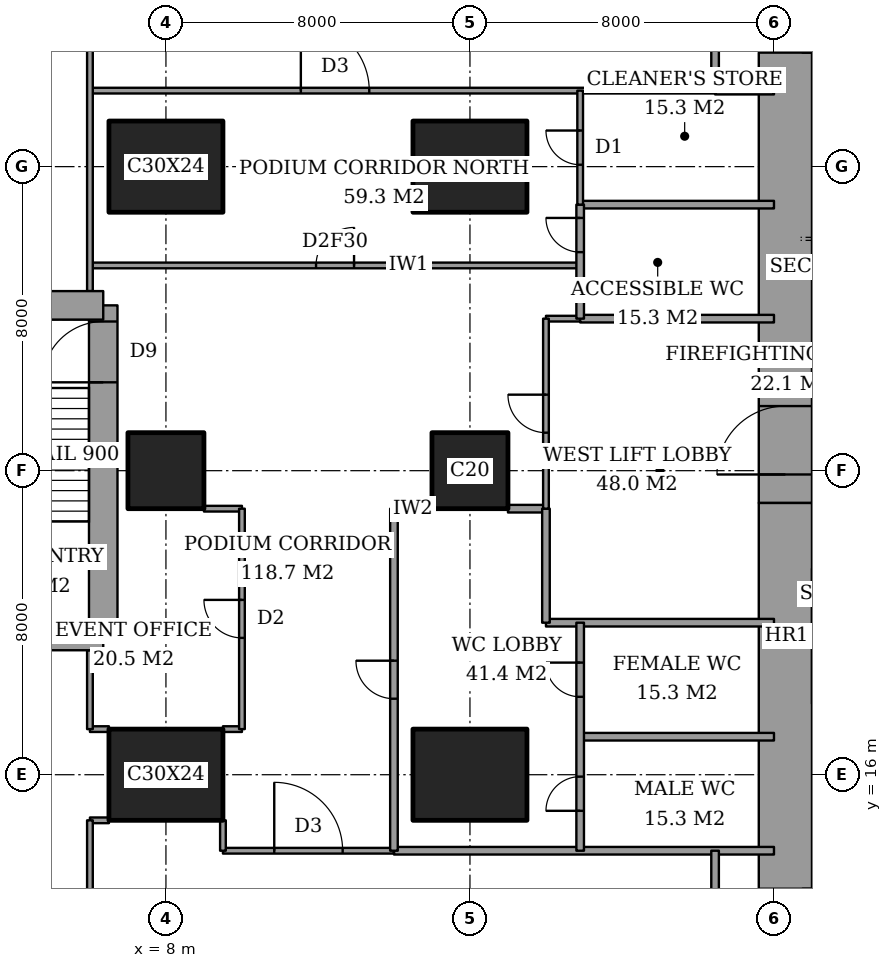
"""IFC4 building model, lengths in metres.
Left out: names, types, materials, properties, quantities, classifications, styles, units other than length and angle.
Written with IfcOpenShell. Run it as: python <this file> out.ifc"""

import sys

from ifc_helpers import new_model, si_unit, direction, frame, frame_2d, origin, origin_2d, place, context, subcontext, project, spatial, rectangle, extrude, element, fill, save


model = new_model("IFC4")
c1 = context("Model", 3, precision=1e-05, world=origin(), true_north=direction((0.0, 1.0)))
c2 = subcontext(c1, "Body", "Model", "MODEL_VIEW")
j1 = project(units=[si_unit("LENGTHUNIT", "METRE"), si_unit("PLANEANGLEUNIT", "RADIAN")], contexts=[c1])
p1 = place(None, origin())
s1 = spatial("IfcSite", under=j1, at=p1, CompositionType="ELEMENT")
p2 = place(p1, origin())
s2 = spatial("IfcBuilding", under=s1, at=p2, CompositionType="ELEMENT")
p3 = place(p2, frame((0.0, 0.0, 21.0)))
s3 = spatial("IfcBuildingStorey", under=s2, at=p3, CompositionType="ELEMENT", Elevation=21.0)
p4 = place(p3, frame((8.0, 16.0, 0.0), z_axis=(0.0, 0.0, 1.0), x_axis=(1.0, 0.0, 0.0)))
e1 = element("IfcColumn", 1, at=p4, inside=s3, PredefinedType="COLUMN", context=c2, shape_type="SweptSolid", body=[
    extrude(rectangle(XDim=3.0, YDim=2.4, at=origin_2d()), origin(), (0.0, 0.0, 1.0), 5.0),
])
p5 = place(p3, frame((8.0, 24.0, 0.0), z_axis=(0.0, 0.0, 1.0), x_axis=(1.0, 0.0, 0.0)))
e2 = element("IfcColumn", 2, at=p5, inside=s3, PredefinedType="COLUMN", context=c2, shape_type="SweptSolid", body=[
    extrude(rectangle(XDim=2.0, YDim=2.0, at=origin_2d()), origin(), (0.0, 0.0, 1.0), 5.0),
])
for number, where, z_axis, x_axis in (
    (3, (8.0, 32.0, 0.0), (0.0, 0.0, 1.0), (1.0, 0.0, 0.0)),
    (4, (16.0, 16.0, 0.0), (0.0, 0.0, 1.0), (1.0, 0.0, 0.0)),
):
    element("IfcColumn", number, at=place(p3, frame(where, z_axis=z_axis, x_axis=x_axis)), inside=s3, PredefinedType="COLUMN", context=c2, shape_type="SweptSolid", body=[
        extrude(rectangle(XDim=3.0, YDim=2.4, at=origin_2d()), origin(), (0.0, 0.0, 1.0), 5.0),
    ])
p6 = place(p3, frame((16.0, 24.0, 0.0), z_axis=(0.0, 0.0, 1.0), x_axis=(1.0, 0.0, 0.0)))
e5 = element("IfcColumn", 5, at=p6, inside=s3, PredefinedType="COLUMN", context=c2, shape_type="SweptSolid", body=[
    extrude(rectangle(XDim=2.0, YDim=2.0, at=origin_2d()), origin(), (0.0, 0.0, 1.0), 5.0),
])
p7 = place(p3, frame((16.0, 32.0, 0.0), z_axis=(0.0, 0.0, 1.0), x_axis=(1.0, 0.0, 0.0)))
e6 = element("IfcColumn", 6, at=p7, inside=s3, PredefinedType="COLUMN", context=c2, shape_type="SweptSolid", body=[
    extrude(rectangle(XDim=3.0, YDim=2.4, at=origin_2d()), origin(), (0.0, 0.0, 1.0), 5.0),
])
p8 = place(p3, frame((24.3, 13.0, 0.0), z_axis=(0.0, 0.0, 1.0), x_axis=(0.0, 1.0, 0.0)))
e7 = element("IfcWall", 7, at=p8, inside=s3, PredefinedType="SHEAR", context=c2, shape_type="SweptSolid", body=[
    extrude(rectangle(XDim=10.15, YDim=1.4, at=frame_2d((5.075, 0.0))), origin(), (0.0, 0.0, 1.0), 5.0),
])
p9 = place(p3, frame((24.3, 23.15, 0.0), z_axis=(0.0, 0.0, 1.0), x_axis=(0.0, 1.0, 0.0)))
e8 = element("IfcWall", 8, at=p9, inside=s3, PredefinedType="SHEAR", context=c2, shape_type="SweptSolid", body=[
    extrude(rectangle(XDim=11.85, YDim=1.4, at=frame_2d((5.925, 0.0))), origin(), (0.0, 0.0, 1.0), 5.0),
])
p10 = place(p9, frame((0.75, 0.0, 0.0)))
e9 = element("IfcOpeningElement", 9, at=p10, cuts=e8, PredefinedType="OPENING", context=c2, shape_type="SweptSolid", body=[
    extrude(rectangle(XDim=1.8, YDim=2.4, at=frame_2d((0.9, 1.2))), frame((0.0, 0.71, 0.0), z_axis=(0.0, -1.0, 0.0), x_axis=(1.0, 0.0, 0.0)), (0.0, 0.0, 1.0), 1.42),
])
p11 = place(p3, frame((1.9, 19.65, 0.0), z_axis=(0.0, 0.0, 1.0), x_axis=(1.0, 0.0, 0.0)))
e10 = element("IfcWall", 10, at=p11, inside=s3, PredefinedType="SHEAR", context=c2, shape_type="SweptSolid", body=[
    extrude(rectangle(XDim=4.45, YDim=0.75, at=frame_2d((2.225, 0.0))), origin(), (0.0, 0.0, 1.0), 5.0),
])
p12 = place(p3, frame((6.35, 19.65, 0.0), z_axis=(0.0, 0.0, 1.0), x_axis=(0.0, 1.0, 0.0)))
e11 = element("IfcWall", 11, at=p12, inside=s3, PredefinedType="SHEAR", context=c2, shape_type="SweptSolid", body=[
    extrude(rectangle(XDim=8.7, YDim=0.75, at=frame_2d((4.35, 0.0))), origin(), (0.0, 0.0, 1.0), 5.0),
])
p13 = place(p12, frame((6.675, 0.0, 0.0)))
e12 = element("IfcOpeningElement", 12, at=p13, cuts=e11, PredefinedType="OPENING", context=c2, shape_type="SweptSolid", body=[
    extrude(rectangle(XDim=1.6, YDim=2.1, at=frame_2d((0.8, 1.05))), frame((0.0, 0.385, 0.0), z_axis=(0.0, -1.0, 0.0), x_axis=(1.0, 0.0, 0.0)), (0.0, 0.0, 1.0), 0.77),
])
p14 = place(p3, frame((6.35, 28.35, 0.0), z_axis=(0.0, 0.0, 1.0), x_axis=(-1.0, 0.0, 0.0)))
e13 = element("IfcWall", 13, at=p14, inside=s3, PredefinedType="SHEAR", context=c2, shape_type="SweptSolid", body=[
    extrude(rectangle(XDim=4.45, YDim=0.75, at=frame_2d((2.225, 0.0))), origin(), (0.0, 0.0, 1.0), 5.0),
])
p15 = place(p3, frame((14.0, 14.0, 0.0), z_axis=(0.0, 0.0, 1.0), x_axis=(1.0, 0.0, 0.0)))
e14 = element("IfcWall", 14, at=p15, inside=s3, PredefinedType="PARTITIONING", context=c2, shape_type="SweptSolid", body=[
    extrude(rectangle(XDim=10.0, YDim=0.2, at=frame_2d((5.0, 0.0))), origin(), (0.0, 0.0, 1.0), 4.65),
])
p16 = place(p3, frame((9.5, 14.0, 0.0), z_axis=(0.0, 0.0, 1.0), x_axis=(1.0, 0.0, 0.0)))
e15 = element("IfcWall", 15, at=p16, inside=s3, PredefinedType="PARTITIONING", context=c2, shape_type="SweptSolid", body=[
    extrude(rectangle(XDim=4.5, YDim=0.15, at=frame_2d((2.25, 0.0))), origin(), (0.0, 0.0, 1.0), 4.65),
])
p17 = place(p16, frame((1.35, 0.0, 0.0)))
e16 = element("IfcOpeningElement", 16, at=p17, cuts=e15, PredefinedType="OPENING", context=c2, shape_type="SweptSolid", body=[
    extrude(rectangle(XDim=1.8, YDim=2.1, at=frame_2d((0.9, 1.05))), frame((0.0, 0.085, 0.0), z_axis=(0.0, -1.0, 0.0), x_axis=(1.0, 0.0, 0.0)), (0.0, 0.0, 1.0), 0.17),
])
p18 = place(p3, frame((6.0, 14.8, 0.0), z_axis=(0.0, 0.0, 1.0), x_axis=(1.0, 0.0, 0.0)))
e17 = element("IfcWall", 17, at=p18, inside=s3, PredefinedType="PARTITIONING", context=c2, shape_type="SweptSolid", body=[
    extrude(rectangle(XDim=0.5, YDim=0.15, at=frame_2d((0.25, 0.0))), origin(), (0.0, 0.0, 1.0), 4.65),
])
p19 = place(p3, frame((18.9, 17.0, 0.0), z_axis=(0.0, 0.0, 1.0), x_axis=(1.0, 0.0, 0.0)))
e18 = element("IfcWall", 18, at=p19, inside=s3, PredefinedType="PARTITIONING", context=c2, shape_type="SweptSolid", body=[
    extrude(rectangle(XDim=5.1, YDim=0.2, at=frame_2d((2.55, 0.0))), origin(), (0.0, 0.0, 1.0), 4.65),
])
for number, where, z_axis, x_axis in (
    (19, (6.0, 17.2, 0.0), (0.0, 0.0, 1.0), (1.0, 0.0, 0.0)),
    (20, (9.5, 17.2, 0.0), (0.0, 0.0, 1.0), (1.0, 0.0, 0.0)),
):
    element("IfcWall", number, at=place(p3, frame(where, z_axis=z_axis, x_axis=x_axis)), inside=s3, PredefinedType="PARTITIONING", context=c2, shape_type="SweptSolid", body=[
        extrude(rectangle(XDim=0.5, YDim=0.15, at=frame_2d((0.25, 0.0))), origin(), (0.0, 0.0, 1.0), 4.65),
    ])
p20 = place(p3, frame((18.0, 20.0, 0.0), z_axis=(0.0, 0.0, 1.0), x_axis=(1.0, 0.0, 0.0)))
e21 = element("IfcWall", 21, at=p20, inside=s3, PredefinedType="PARTITIONING", context=c2, shape_type="SweptSolid", body=[
    extrude(rectangle(XDim=6.0, YDim=0.2, at=frame_2d((3.0, 0.0))), origin(), (0.0, 0.0, 1.0), 4.65),
])
for number, where, z_axis, x_axis in (
    (22, (14.0, 23.0, 0.0), (0.0, 0.0, 1.0), (1.0, 0.0, 0.0)),
    (23, (17.0, 23.0, 0.0), (0.0, 0.0, 1.0), (1.0, 0.0, 0.0)),
):
    element("IfcWall", number, at=place(p3, frame(where, z_axis=z_axis, x_axis=x_axis)), inside=s3, PredefinedType="PARTITIONING", context=c2, shape_type="SweptSolid", body=[
        extrude(rectangle(XDim=1.0, YDim=0.2, at=frame_2d((0.5, 0.0))), origin(), (0.0, 0.0, 1.0), 4.65),
    ])
p21 = place(p3, frame((9.0, 23.0, 0.0), z_axis=(0.0, 0.0, 1.0), x_axis=(1.0, 0.0, 0.0)))
e24 = element("IfcWall", 24, at=p21, inside=s3, PredefinedType="PARTITIONING", context=c2, shape_type="SweptSolid", body=[
    extrude(rectangle(XDim=1.0, YDim=0.15, at=frame_2d((0.5, 0.0))), origin(), (0.0, 0.0, 1.0), 4.65),
])
p22 = place(p3, frame((18.9, 28.0, 0.0), z_axis=(0.0, 0.0, 1.0), x_axis=(1.0, 0.0, 0.0)))
e25 = element("IfcWall", 25, at=p22, inside=s3, PredefinedType="PARTITIONING", context=c2, shape_type="SweptSolid", body=[
    extrude(rectangle(XDim=5.1, YDim=0.2, at=frame_2d((2.55, 0.0))), origin(), (0.0, 0.0, 1.0), 4.65),
])
p23 = place(p3, frame((18.0, 28.0, 0.0), z_axis=(0.0, 0.0, 1.0), x_axis=(1.0, 0.0, 0.0)))
e26 = element("IfcWall", 26, at=p23, inside=s3, PredefinedType="PARTITIONING", context=c2, shape_type="SweptSolid", body=[
    extrude(rectangle(XDim=0.9, YDim=0.15, at=frame_2d((0.45, 0.0))), origin(), (0.0, 0.0, 1.0), 4.65),
])
p24 = place(p3, frame((6.0, 29.4, 0.0), z_axis=(0.0, 0.0, 1.0), x_axis=(1.0, 0.0, 0.0)))
e27 = element("IfcWall", 27, at=p24, inside=s3, PredefinedType="PARTITIONING", context=c2, shape_type="SweptSolid", body=[
    extrude(rectangle(XDim=12.9, YDim=0.15, at=frame_2d((6.45, 0.0))), origin(), (0.0, 0.0, 1.0), 4.65),
])
p25 = place(p24, frame((5.95, 0.0, 0.0)))
e28 = element("IfcOpeningElement", 28, at=p25, cuts=e27, PredefinedType="OPENING", context=c2, shape_type="SweptSolid", body=[
    extrude(rectangle(XDim=1.0, YDim=2.1, at=frame_2d((0.5, 1.05))), frame((0.0, 0.085, 0.0), z_axis=(0.0, -1.0, 0.0), x_axis=(1.0, 0.0, 0.0)), (0.0, 0.0, 1.0), 0.17),
])
p26 = place(p3, frame((18.9, 31.0, 0.0), z_axis=(0.0, 0.0, 1.0), x_axis=(1.0, 0.0, 0.0)))
e29 = element("IfcWall", 29, at=p26, inside=s3, PredefinedType="PARTITIONING", context=c2, shape_type="SweptSolid", body=[
    extrude(rectangle(XDim=5.1, YDim=0.2, at=frame_2d((2.55, 0.0))), origin(), (0.0, 0.0, 1.0), 4.65),
])
p27 = place(p3, frame((22.45, 34.0, 0.0), z_axis=(0.0, 0.0, 1.0), x_axis=(1.0, 0.0, 0.0)))
e30 = element("IfcWall", 30, at=p27, inside=s3, PredefinedType="PARTITIONING", context=c2, shape_type="SweptSolid", body=[
    extrude(rectangle(XDim=1.55, YDim=0.2, at=frame_2d((0.775, 0.0))), origin(), (0.0, 0.0, 1.0), 4.65),
])
p28 = place(p3, frame((6.0, 34.0, 0.0), z_axis=(0.0, 0.0, 1.0), x_axis=(1.0, 0.0, 0.0)))
e31 = element("IfcWall", 31, at=p28, inside=s3, PredefinedType="PARTITIONING", context=c2, shape_type="SweptSolid", body=[
    extrude(rectangle(XDim=16.45, YDim=0.15, at=frame_2d((8.225, 0.0))), origin(), (0.0, 0.0, 1.0), 4.65),
])
p29 = place(p28, frame((5.55, 0.0, 0.0)))
e32 = element("IfcOpeningElement", 32, at=p29, cuts=e31, PredefinedType="OPENING", context=c2, shape_type="SweptSolid", body=[
    extrude(rectangle(XDim=1.8, YDim=2.1, at=frame_2d((0.9, 1.05))), frame((0.0, 0.085, 0.0), z_axis=(0.0, -1.0, 0.0), x_axis=(1.0, 0.0, 0.0)), (0.0, 0.0, 1.0), 0.17),
])
p30 = place(p3, frame((6.0, 12.0, 0.0), z_axis=(0.0, 0.0, 1.0), x_axis=(0.0, 1.0, 0.0)))
e33 = element("IfcWall", 33, at=p30, inside=s3, PredefinedType="PARTITIONING", context=c2, shape_type="SweptSolid", body=[
    extrude(rectangle(XDim=2.8, YDim=0.15, at=frame_2d((1.4, 0.0))), origin(), (0.0, 0.0, 1.0), 4.65),
])
p31 = place(p3, frame((6.0, 17.2, 0.0), z_axis=(0.0, 0.0, 1.0), x_axis=(0.0, 1.0, 0.0)))
e34 = element("IfcWall", 34, at=p31, inside=s3, PredefinedType="PARTITIONING", context=c2, shape_type="SweptSolid", body=[
    extrude(rectangle(XDim=2.075, YDim=0.15, at=frame_2d((1.038, 0.0))), origin(), (0.0, 0.0, 1.0), 4.65),
])
p32 = place(p3, frame((6.0, 28.725, 0.0), z_axis=(0.0, 0.0, 1.0), x_axis=(0.0, 1.0, 0.0)))
e35 = element("IfcWall", 35, at=p32, inside=s3, PredefinedType="PARTITIONING", context=c2, shape_type="SweptSolid", body=[
    extrude(rectangle(XDim=7.275, YDim=0.15, at=frame_2d((3.637, 0.0))), origin(), (0.0, 0.0, 1.0), 4.65),
])
p33 = place(p3, frame((9.5, 14.0, 0.0), z_axis=(0.0, 0.0, 1.0), x_axis=(0.0, 1.0, 0.0)))
e36 = element("IfcWall", 36, at=p33, inside=s3, PredefinedType="PARTITIONING", context=c2, shape_type="SweptSolid", body=[
    extrude(rectangle(XDim=0.8, YDim=0.15, at=frame_2d((0.4, 0.0))), origin(), (0.0, 0.0, 1.0), 4.65),
])
p34 = place(p3, frame((10.0, 17.2, 0.0), z_axis=(0.0, 0.0, 1.0), x_axis=(0.0, 1.0, 0.0)))
e37 = element("IfcWall", 37, at=p34, inside=s3, PredefinedType="PARTITIONING", context=c2, shape_type="SweptSolid", body=[
    extrude(rectangle(XDim=5.8, YDim=0.15, at=frame_2d((2.9, 0.0))), origin(), (0.0, 0.0, 1.0), 4.65),
])
p35 = place(p34, frame((2.4, 0.0, 0.0)))
e38 = element("IfcOpeningElement", 38, at=p35, cuts=e37, PredefinedType="OPENING", context=c2, shape_type="SweptSolid", body=[
    extrude(rectangle(XDim=1.0, YDim=2.1, at=frame_2d((0.5, 1.05))), frame((0.0, 0.085, 0.0), z_axis=(0.0, -1.0, 0.0), x_axis=(1.0, 0.0, 0.0)), (0.0, 0.0, 1.0), 0.17),
])
p36 = place(p3, frame((14.0, 14.0, 0.0), z_axis=(0.0, 0.0, 1.0), x_axis=(0.0, 1.0, 0.0)))
e39 = element("IfcWall", 39, at=p36, inside=s3, PredefinedType="PARTITIONING", context=c2, shape_type="SweptSolid", body=[
    extrude(rectangle(XDim=9.0, YDim=0.2, at=frame_2d((4.5, 0.0))), origin(), (0.0, 0.0, 1.0), 4.65),
])
p37 = place(p36, frame((4.0, 0.0, 0.0)))
e40 = element("IfcOpeningElement", 40, at=p37, cuts=e39, PredefinedType="OPENING", context=c2, shape_type="SweptSolid", body=[
    extrude(rectangle(XDim=1.0, YDim=2.1, at=frame_2d((0.5, 1.05))), frame((0.0, 0.11, 0.0), z_axis=(0.0, -1.0, 0.0), x_axis=(1.0, 0.0, 0.0)), (0.0, 0.0, 1.0), 0.22),
])
p38 = place(p3, frame((18.0, 20.0, 0.0), z_axis=(0.0, 0.0, 1.0), x_axis=(0.0, 1.0, 0.0)))
e41 = element("IfcWall", 41, at=p38, inside=s3, PredefinedType="PARTITIONING", context=c2, shape_type="SweptSolid", body=[
    extrude(rectangle(XDim=3.0, YDim=0.2, at=frame_2d((1.5, 0.0))), origin(), (0.0, 0.0, 1.0), 4.65),
])
p39 = place(p3, frame((18.0, 23.0, 0.0), z_axis=(0.0, 0.0, 1.0), x_axis=(0.0, 1.0, 0.0)))
e42 = element("IfcWall", 42, at=p39, inside=s3, PredefinedType="PARTITIONING", context=c2, shape_type="SweptSolid", body=[
    extrude(rectangle(XDim=5.0, YDim=0.15, at=frame_2d((2.5, 0.0))), origin(), (0.0, 0.0, 1.0), 4.65),
])
p40 = place(p39, frame((2.0, 0.0, 0.0)))
e43 = element("IfcOpeningElement", 43, at=p40, cuts=e42, PredefinedType="OPENING", context=c2, shape_type="SweptSolid", body=[
    extrude(rectangle(XDim=1.0, YDim=2.1, at=frame_2d((0.5, 1.05))), frame((0.0, 0.085, 0.0), z_axis=(0.0, -1.0, 0.0), x_axis=(1.0, 0.0, 0.0)), (0.0, 0.0, 1.0), 0.17),
])
p41 = place(p3, frame((18.9, 14.0, 0.0), z_axis=(0.0, 0.0, 1.0), x_axis=(0.0, 1.0, 0.0)))
e44 = element("IfcWall", 44, at=p41, inside=s3, PredefinedType="PARTITIONING", context=c2, shape_type="SweptSolid", body=[
    extrude(rectangle(XDim=6.0, YDim=0.2, at=frame_2d((3.0, 0.0))), origin(), (0.0, 0.0, 1.0), 4.65),
])
p42 = place(p41, frame((1.05, 0.0, 0.0)))
e45 = element("IfcOpeningElement", 45, at=p42, cuts=e44, PredefinedType="OPENING", context=c2, shape_type="SweptSolid", body=[
    extrude(rectangle(XDim=0.9, YDim=2.1, at=frame_2d((0.45, 1.05))), frame((0.0, 0.11, 0.0), z_axis=(0.0, -1.0, 0.0), x_axis=(1.0, 0.0, 0.0)), (0.0, 0.0, 1.0), 0.22),
])
p43 = place(p41, frame((4.05, 0.0, 0.0)))
e46 = element("IfcOpeningElement", 46, at=p43, cuts=e44, PredefinedType="OPENING", context=c2, shape_type="SweptSolid", body=[
    extrude(rectangle(XDim=0.9, YDim=2.1, at=frame_2d((0.45, 1.05))), frame((0.0, 0.11, 0.0), z_axis=(0.0, -1.0, 0.0), x_axis=(1.0, 0.0, 0.0)), (0.0, 0.0, 1.0), 0.22),
])
p44 = place(p3, frame((18.9, 28.0, 0.0), z_axis=(0.0, 0.0, 1.0), x_axis=(0.0, 1.0, 0.0)))
e47 = element("IfcWall", 47, at=p44, inside=s3, PredefinedType="PARTITIONING", context=c2, shape_type="SweptSolid", body=[
    extrude(rectangle(XDim=3.0, YDim=0.2, at=frame_2d((1.5, 0.0))), origin(), (0.0, 0.0, 1.0), 4.65),
])
p45 = place(p44, frame((1.75, 0.0, 0.0)))
e48 = element("IfcOpeningElement", 48, at=p45, cuts=e47, PredefinedType="OPENING", context=c2, shape_type="SweptSolid", body=[
    extrude(rectangle(XDim=0.9, YDim=2.1, at=frame_2d((0.45, 1.05))), frame((0.0, 0.11, 0.0), z_axis=(0.0, -1.0, 0.0), x_axis=(1.0, 0.0, 0.0)), (0.0, 0.0, 1.0), 0.22),
])
p46 = place(p3, frame((18.9, 31.0, 0.0), z_axis=(0.0, 0.0, 1.0), x_axis=(0.0, 1.0, 0.0)))
e49 = element("IfcWall", 49, at=p46, inside=s3, PredefinedType="PARTITIONING", context=c2, shape_type="SweptSolid", body=[
    extrude(rectangle(XDim=3.0, YDim=0.15, at=frame_2d((1.5, 0.0))), origin(), (0.0, 0.0, 1.0), 4.65),
])
p47 = place(p46, frame((1.05, 0.0, 0.0)))
e50 = element("IfcOpeningElement", 50, at=p47, cuts=e49, PredefinedType="OPENING", context=c2, shape_type="SweptSolid", body=[
    extrude(rectangle(XDim=0.9, YDim=2.1, at=frame_2d((0.45, 1.05))), frame((0.0, 0.085, 0.0), z_axis=(0.0, -1.0, 0.0), x_axis=(1.0, 0.0, 0.0)), (0.0, 0.0, 1.0), 0.17),
])
p48 = place(p3, frame((22.45, -0.45, 0.0), z_axis=(0.0, 0.0, 1.0), x_axis=(0.0, 1.0, 0.0)))
e51 = element("IfcWall", 51, at=p48, inside=s3, PredefinedType="PARTITIONING", context=c2, shape_type="SweptSolid", body=[
    extrude(rectangle(XDim=14.45, YDim=0.2, at=frame_2d((7.225, 0.0))), origin(), (0.0, 0.0, 1.0), 4.65),
])
p49 = place(p3, frame((22.45, 34.0, 0.0), z_axis=(0.0, 0.0, 1.0), x_axis=(0.0, 1.0, 0.0)))
e52 = element("IfcWall", 52, at=p49, inside=s3, PredefinedType="PARTITIONING", context=c2, shape_type="SweptSolid", body=[
    extrude(rectangle(XDim=14.561, YDim=0.2, at=frame_2d((7.281, 0.0))), origin(), (0.0, 0.0, 1.0), 4.65),
])
p50 = place(p3, frame((24.85, -0.45, 0.0), z_axis=(0.0, 0.0, 1.0), x_axis=(0.0, 1.0, 0.0)))
e53 = element("IfcWall", 53, at=p50, inside=s3, PredefinedType="PARTITIONING", context=c2, shape_type="SweptSolid", body=[
    extrude(rectangle(XDim=13.45, YDim=0.2, at=frame_2d((6.725, 0.0))), origin(), (0.0, 0.0, 1.0), 4.65),
])
p51 = place(p17, origin())
e54 = element("IfcDoor", 54, at=p51, inside=s3, OperationType="DOUBLE_DOOR_DOUBLE_SWING", PredefinedType="DOOR", context=c2, shape_type="SweptSolid", body=[
    extrude(rectangle(XDim=1.8, YDim=2.1, at=frame_2d((0.9, 1.05))), frame((0.0, 0.025, 0.0), z_axis=(0.0, -1.0, 0.0), x_axis=(1.0, 0.0, 0.0)), (0.0, 0.0, 1.0), 0.05),
])
fill(e16, e54)
p52 = place(p29, origin())
e55 = element("IfcDoor", 55, at=p52, inside=s3, OperationType="DOUBLE_DOOR_DOUBLE_SWING", PredefinedType="DOOR", context=c2, shape_type="SweptSolid", body=[
    extrude(rectangle(XDim=1.8, YDim=2.1, at=frame_2d((0.9, 1.05))), frame((0.0, 0.025, 0.0), z_axis=(0.0, -1.0, 0.0), x_axis=(1.0, 0.0, 0.0)), (0.0, 0.0, 1.0), 0.05),
])
fill(e32, e55)
p53 = place(p35, origin())
e56 = element("IfcDoor", 56, at=p53, inside=s3, OperationType="SINGLE_SWING_LEFT", PredefinedType="DOOR", context=c2, shape_type="SweptSolid", body=[
    extrude(rectangle(XDim=1.0, YDim=2.1, at=frame_2d((0.5, 1.05))), frame((0.0, 0.025, 0.0), z_axis=(0.0, -1.0, 0.0), x_axis=(1.0, 0.0, 0.0)), (0.0, 0.0, 1.0), 0.05),
])
fill(e38, e56)
p54 = place(p37, origin())
e57 = element("IfcDoor", 57, at=p54, inside=s3, OperationType="SINGLE_SWING_LEFT", PredefinedType="DOOR", context=c2, shape_type="SweptSolid", body=[
    extrude(rectangle(XDim=1.0, YDim=2.1, at=frame_2d((0.5, 1.05))), frame((0.0, 0.025, 0.0), z_axis=(0.0, -1.0, 0.0), x_axis=(1.0, 0.0, 0.0)), (0.0, 0.0, 1.0), 0.05),
])
fill(e40, e57)
p55 = place(p40, origin())
e58 = element("IfcDoor", 58, at=p55, inside=s3, OperationType="SINGLE_SWING_LEFT", PredefinedType="DOOR", context=c2, shape_type="SweptSolid", body=[
    extrude(rectangle(XDim=1.0, YDim=2.1, at=frame_2d((0.5, 1.05))), frame((0.0, 0.025, 0.0), z_axis=(0.0, -1.0, 0.0), x_axis=(1.0, 0.0, 0.0)), (0.0, 0.0, 1.0), 0.05),
])
fill(e43, e58)
p56 = place(p42, origin())
e59 = element("IfcDoor", 59, at=p56, inside=s3, OperationType="SINGLE_SWING_RIGHT", PredefinedType="DOOR", context=c2, shape_type="SweptSolid", body=[
    extrude(rectangle(XDim=0.9, YDim=2.1, at=frame_2d((0.45, 1.05))), frame((0.0, 0.025, 0.0), z_axis=(0.0, -1.0, 0.0), x_axis=(1.0, 0.0, 0.0)), (0.0, 0.0, 1.0), 0.05),
])
fill(e45, e59)
p57 = place(p43, origin())
e60 = element("IfcDoor", 60, at=p57, inside=s3, OperationType="SINGLE_SWING_LEFT", PredefinedType="DOOR", context=c2, shape_type="SweptSolid", body=[
    extrude(rectangle(XDim=0.9, YDim=2.1, at=frame_2d((0.45, 1.05))), frame((0.0, 0.025, 0.0), z_axis=(0.0, -1.0, 0.0), x_axis=(1.0, 0.0, 0.0)), (0.0, 0.0, 1.0), 0.05),
])
fill(e46, e60)
p58 = place(p45, origin())
e61 = element("IfcDoor", 61, at=p58, inside=s3, OperationType="SINGLE_SWING_LEFT", PredefinedType="DOOR", context=c2, shape_type="SweptSolid", body=[
    extrude(rectangle(XDim=0.9, YDim=2.1, at=frame_2d((0.45, 1.05))), frame((0.0, 0.025, 0.0), z_axis=(0.0, -1.0, 0.0), x_axis=(1.0, 0.0, 0.0)), (0.0, 0.0, 1.0), 0.05),
])
fill(e48, e61)
p59 = place(p25, origin())
e62 = element("IfcDoor", 62, at=p59, inside=s3, OperationType="SINGLE_SWING_LEFT", PredefinedType="DOOR", context=c2, shape_type="SweptSolid", body=[
    extrude(rectangle(XDim=1.0, YDim=2.1, at=frame_2d((0.5, 1.05))), frame((0.0, 0.025, 0.0), z_axis=(0.0, -1.0, 0.0), x_axis=(1.0, 0.0, 0.0)), (0.0, 0.0, 1.0), 0.05),
])
fill(e28, e62)
p60 = place(p47, origin())
e63 = element("IfcDoor", 63, at=p60, inside=s3, OperationType="SINGLE_SWING_LEFT", PredefinedType="DOOR", context=c2, shape_type="SweptSolid", body=[
    extrude(rectangle(XDim=0.9, YDim=2.1, at=frame_2d((0.45, 1.05))), frame((0.0, 0.025, 0.0), z_axis=(0.0, -1.0, 0.0), x_axis=(1.0, 0.0, 0.0)), (0.0, 0.0, 1.0), 0.05),
])
fill(e50, e63)
p61 = place(p10, origin())
e64 = element("IfcDoor", 64, at=p61, inside=s3, OperationType="DOUBLE_DOOR_DOUBLE_SWING", PredefinedType="DOOR", context=c2, shape_type="SweptSolid", body=[
    extrude(rectangle(XDim=1.8, YDim=2.4, at=frame_2d((0.9, 1.2))), frame((0.0, 0.025, 0.0), z_axis=(0.0, -1.0, 0.0), x_axis=(1.0, 0.0, 0.0)), (0.0, 0.0, 1.0), 0.05),
])
fill(e9, e64)
p62 = place(p13, origin())
e65 = element("IfcDoor", 65, at=p62, inside=s3, OperationType="DOUBLE_DOOR_SINGLE_SWING", PredefinedType="DOOR", context=c2, shape_type="SweptSolid", body=[
    extrude(rectangle(XDim=1.6, YDim=2.1, at=frame_2d((0.8, 1.05))), frame((0.0, 0.025, 0.0), z_axis=(0.0, -1.0, 0.0), x_axis=(1.0, 0.0, 0.0)), (0.0, 0.0, 1.0), 0.05),
])
fill(e12, e65)
save(model, sys.argv[1])
